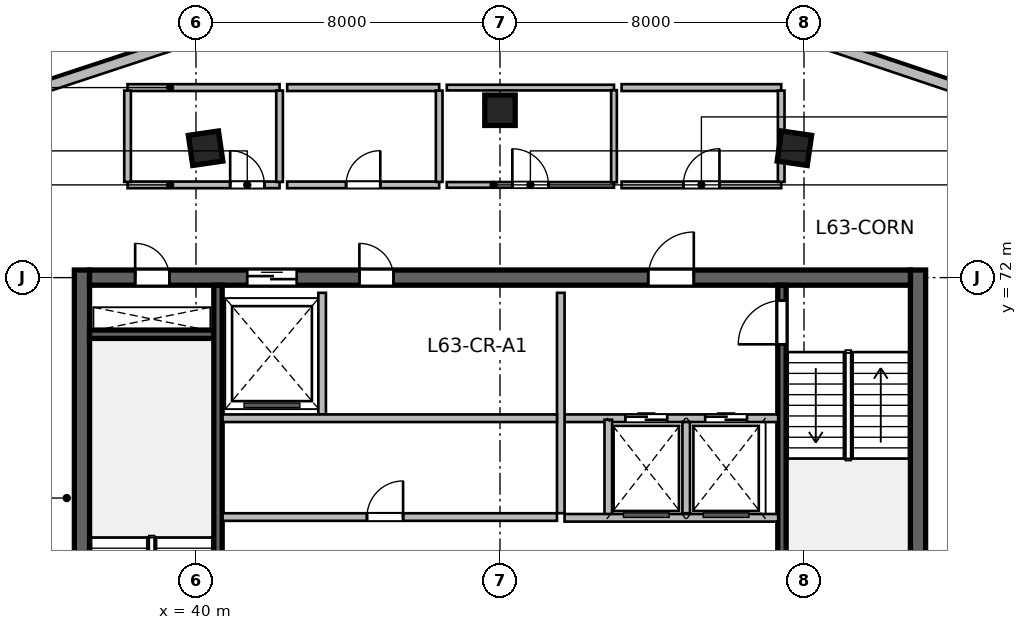
"""IFC4 building model, lengths in metres.
Left out: names, types, materials, properties, quantities, classifications, styles, units other than length and angle.
Written with IfcOpenShell. Run it as: python <this file> out.ifc"""

import sys

from ifc_helpers import new_model, si_unit, direction, frame, frame_2d, origin, origin_2d, place, context, subcontext, project, spatial, rectangle, extrude, source, transform, mapped, element, fill, save


model = new_model("IFC4")
c1 = context("Model", 3, precision=1e-05, world=origin(), true_north=direction((0.0, 1.0)))
c2 = subcontext(c1, "Body", "Model", "MODEL_VIEW")
j1 = project(units=[si_unit("LENGTHUNIT", "METRE"), si_unit("PLANEANGLEUNIT", "RADIAN")], contexts=[c1])
p1 = place(None, origin())
s1 = spatial("IfcSite", under=j1, at=p1, CompositionType="ELEMENT")
p2 = place(p1, origin())
s2 = spatial("IfcBuilding", under=s1, at=p2, CompositionType="ELEMENT")
p3 = place(p2, frame((0.0, 0.0, 260.1)))
s3 = spatial("IfcBuildingStorey", under=s2, at=p3, CompositionType="ELEMENT", Elevation=260.1)
m1 = source(origin(), c2, "Body", "SweptSolid", [
    extrude(rectangle(XDim=12.0, YDim=0.4, at=frame_2d((6.0, 0.0))), origin(), (0.0, 0.0, 1.0), 3.9),
])
for number, where, z_axis, x_axis in (
    (1, (37.0, 60.2, 0.0), (0.0, 0.0, 1.0), (0.0, 1.0, 0.0)),
    (2, (59.0, 60.2, 0.0), (0.0, 0.0, 1.0), (0.0, 1.0, 0.0)),
):
    element("IfcWall", number, at=place(p3, frame(where, z_axis=z_axis, x_axis=x_axis)), inside=s3, PredefinedType="SHEAR", context=c2, shape_type="MappedRepresentation", body=[
        mapped(m1, transform((0.0, 0.0, 0.0), scale=1.0)),
    ])
m2 = source(origin(), c2, "Body", "SweptSolid", [
    extrude(rectangle(XDim=21.6, YDim=0.4, at=frame_2d((10.8, 0.0))), origin(), (0.0, 0.0, 1.0), 3.9),
])
p4 = place(p3, frame((37.2, 72.0, 0.0), z_axis=(0.0, 0.0, 1.0), x_axis=(1.0, 0.0, 0.0)))
e3 = element("IfcWall", 3, at=p4, inside=s3, PredefinedType="SHEAR", context=c2, shape_type="MappedRepresentation", body=[
    mapped(m2, transform((0.0, 0.0, 0.0), scale=1.0)),
])
p5 = place(p4, frame((1.2, 0.0, 0.0)))
e4 = element("IfcOpeningElement", 4, at=p5, cuts=e3, PredefinedType="OPENING", context=c2, shape_type="SweptSolid", body=[
    extrude(rectangle(XDim=0.9, YDim=2.1, at=frame_2d((0.45, 1.05))), frame((0.0, 0.21, 0.0), z_axis=(0.0, -1.0, 0.0), x_axis=(1.0, 0.0, 0.0)), (0.0, 0.0, 1.0), 0.42),
])
p6 = place(p4, frame((14.7, 0.0, 0.0)))
e5 = element("IfcOpeningElement", 5, at=p6, cuts=e3, PredefinedType="OPENING", context=c2, shape_type="SweptSolid", body=[
    extrude(rectangle(XDim=1.2, YDim=2.15, at=frame_2d((0.6, 1.075))), frame((0.0, 0.21, 0.0), z_axis=(0.0, -1.0, 0.0), x_axis=(1.0, 0.0, 0.0)), (0.0, 0.0, 1.0), 0.42),
])
p7 = place(p4, frame((4.15, 0.0, 0.0)))
e6 = element("IfcOpeningElement", 6, at=p7, cuts=e3, PredefinedType="OPENING", context=c2, shape_type="SweptSolid", body=[
    extrude(rectangle(XDim=1.3, YDim=2.15, at=frame_2d((0.65, 1.075))), frame((0.0, 0.21, 0.0), z_axis=(0.0, -1.0, 0.0), x_axis=(1.0, 0.0, 0.0)), (0.0, 0.0, 1.0), 0.42),
])
p8 = place(p4, frame((7.1, 0.0, 0.0)))
e7 = element("IfcOpeningElement", 7, at=p8, cuts=e3, PredefinedType="OPENING", context=c2, shape_type="SweptSolid", body=[
    extrude(rectangle(XDim=0.9, YDim=2.1, at=frame_2d((0.45, 1.05))), frame((0.0, 0.21, 0.0), z_axis=(0.0, -1.0, 0.0), x_axis=(1.0, 0.0, 0.0)), (0.0, 0.0, 1.0), 0.42),
])
m3 = source(origin(), c2, "Body", "SweptSolid", [
    extrude(rectangle(XDim=3.27, YDim=0.22, at=frame_2d((1.635, 0.0))), origin(), (0.0, 0.0, 1.0), 3.9),
])
p9 = place(p3, frame((37.2, 70.51, 0.0), z_axis=(0.0, 0.0, 1.0), x_axis=(1.0, 0.0, 0.0)))
e8 = element("IfcWall", 8, at=p9, inside=s3, PredefinedType="SHEAR", context=c2, shape_type="MappedRepresentation", body=[
    mapped(m3, transform((0.0, 0.0, 0.0), scale=1.0)),
])
m4 = source(origin(), c2, "Body", "SweptSolid", [
    extrude(rectangle(XDim=11.2, YDim=0.22, at=frame_2d((5.6, 0.0))), origin(), (0.0, 0.0, 1.0), 3.9),
])
p10 = place(p3, frame((40.58, 60.6, 0.0), z_axis=(0.0, 0.0, 1.0), x_axis=(0.0, 1.0, 0.0)))
e9 = element("IfcWall", 9, at=p10, inside=s3, PredefinedType="SHEAR", context=c2, shape_type="MappedRepresentation", body=[
    mapped(m4, transform((0.0, 0.0, 0.0), scale=1.0)),
])
p11 = place(p3, frame((55.42, 60.6, 0.0), z_axis=(0.0, 0.0, 1.0), x_axis=(0.0, 1.0, 0.0)))
e10 = element("IfcWall", 10, at=p11, inside=s3, PredefinedType="SHEAR", context=c2, shape_type="MappedRepresentation", body=[
    mapped(m4, transform((0.0, 0.0, 0.0), scale=1.0)),
])
p12 = place(p11, frame((9.645, 0.0, 0.0)))
e11 = element("IfcOpeningElement", 11, at=p12, cuts=e10, PredefinedType="OPENING", context=c2, shape_type="SweptSolid", body=[
    extrude(rectangle(XDim=1.15, YDim=2.15, at=frame_2d((0.575, 1.075))), frame((0.0, 0.12, 0.0), z_axis=(0.0, -1.0, 0.0), x_axis=(1.0, 0.0, 0.0)), (0.0, 0.0, 1.0), 0.24),
])
m5 = source(origin(), c2, "Body", "SweptSolid", [
    extrude(rectangle(XDim=0.8, YDim=0.8, at=origin_2d()), origin(), (0.0, 0.0, 1.0), 3.9),
])
for number, where, z_axis, x_axis in (
    (12, (40.253, 75.404, 0.0), (0.0, 0.0, 1.0), (-0.143, 0.99, 0.0)),
    (13, (48.0, 76.404, 0.0), (0.0, 0.0, 1.0), (0.0, 1.0, 0.0)),
    (14, (55.747, 75.404, 0.0), (0.0, 0.0, 1.0), (0.143, 0.99, 0.0)),
):
    element("IfcColumn", number, at=place(p3, frame(where, z_axis=z_axis, x_axis=x_axis)), inside=s3, PredefinedType="COLUMN", context=c2, shape_type="MappedRepresentation", body=[
        mapped(m5, transform((0.0, 0.0, 0.0), scale=1.0)),
    ])
m6 = source(origin(), c2, "Body", "SweptSolid", [
    extrude(rectangle(XDim=3.54, YDim=0.28, at=frame_2d((1.77, 0.0))), origin(), (0.0, 0.0, 1.0), 3.65),
])
p13 = place(p3, frame((36.132, 77.049, 0.0), z_axis=(0.0, 0.0, 1.0), x_axis=(0.949678507031, 0.313226329165, 0.0)))
e15 = element("IfcWall", 15, at=p13, inside=s3, PredefinedType="SOLIDWALL", context=c2, shape_type="MappedRepresentation", body=[
    mapped(m6, transform((0.0, 0.0, 0.0), scale=1.0)),
])
m7 = source(origin(), c2, "Body", "SweptSolid", [
    extrude(rectangle(XDim=3.543, YDim=0.28, at=frame_2d((1.771, 0.0))), origin(), (0.0, 0.0, 1.0), 3.65),
])
p14 = place(p3, frame((56.688, 78.108, 0.0), z_axis=(0.0, 0.0, 1.0), x_axis=(0.947922565312, -0.318500879389, 0.0)))
e16 = element("IfcWall", 16, at=p14, inside=s3, PredefinedType="SOLIDWALL", context=c2, shape_type="MappedRepresentation", body=[
    mapped(m7, transform((0.0, 0.0, 0.0), scale=1.0)),
])
m8 = source(origin(), c2, "Body", "SweptSolid", [
    extrude(rectangle(XDim=5.62, YDim=0.2, at=frame_2d((2.81, 0.0))), origin(), (0.0, 0.0, 1.0), 3.65),
])
p15 = place(p3, frame((49.7, 68.3, 0.0), z_axis=(0.0, 0.0, 1.0), x_axis=(1.0, 0.0, 0.0)))
e17 = element("IfcWall", 17, at=p15, inside=s3, PredefinedType="SOLIDWALL", context=c2, shape_type="MappedRepresentation", body=[
    mapped(m8, transform((0.0, 0.0, 0.0), scale=1.0)),
])
p16 = place(p15, frame((1.6, 0.0, 0.0)))
e18 = element("IfcOpeningElement", 18, at=p16, cuts=e17, PredefinedType="OPENING", context=c2, shape_type="SweptSolid", body=[
    extrude(rectangle(XDim=1.1, YDim=2.15, at=frame_2d((0.55, 1.075))), frame((0.0, 0.11, 0.0), z_axis=(0.0, -1.0, 0.0), x_axis=(1.0, 0.0, 0.0)), (0.0, 0.0, 1.0), 0.22),
])
p17 = place(p15, frame((3.7, 0.0, 0.0)))
e19 = element("IfcOpeningElement", 19, at=p17, cuts=e17, PredefinedType="OPENING", context=c2, shape_type="SweptSolid", body=[
    extrude(rectangle(XDim=1.1, YDim=2.15, at=frame_2d((0.55, 1.075))), frame((0.0, 0.11, 0.0), z_axis=(0.0, -1.0, 0.0), x_axis=(1.0, 0.0, 0.0)), (0.0, 0.0, 1.0), 0.22),
])
m9 = source(origin(), c2, "Body", "SweptSolid", [
    extrude(rectangle(XDim=5.8, YDim=0.2, at=frame_2d((2.9, 0.0))), origin(), (0.0, 0.0, 1.0), 3.65),
])
p18 = place(p3, frame((49.6, 65.8, 0.0), z_axis=(0.0, 0.0, 1.0), x_axis=(0.0, 1.0, 0.0)))
e20 = element("IfcWall", 20, at=p18, inside=s3, PredefinedType="SOLIDWALL", context=c2, shape_type="MappedRepresentation", body=[
    mapped(m9, transform((0.0, 0.0, 0.0), scale=1.0)),
])
m10 = source(origin(), c2, "Body", "SweptSolid", [
    extrude(rectangle(XDim=2.58, YDim=0.2, at=frame_2d((1.29, 0.0))), origin(), (0.0, 0.0, 1.0), 3.65),
])
p19 = place(p3, frame((50.85, 65.68, 0.0), z_axis=(0.0, 0.0, 1.0), x_axis=(0.0, 1.0, 0.0)))
e21 = element("IfcWall", 21, at=p19, inside=s3, PredefinedType="SOLIDWALL", context=c2, shape_type="MappedRepresentation", body=[
    mapped(m10, transform((0.0, 0.0, 0.0), scale=1.0)),
])
m11 = source(origin(), c2, "Body", "SweptSolid", [
    extrude(rectangle(XDim=2.4, YDim=0.2, at=frame_2d((1.2, 0.0))), origin(), (0.0, 0.0, 1.0), 3.65),
])
p20 = place(p3, frame((52.9, 65.8, 0.0), z_axis=(0.0, 0.0, 1.0), x_axis=(0.0, 1.0, 0.0)))
e22 = element("IfcWall", 22, at=p20, inside=s3, PredefinedType="SOLIDWALL", context=c2, shape_type="MappedRepresentation", body=[
    mapped(m11, transform((0.0, 0.0, 0.0), scale=1.0)),
])
p21 = place(p3, frame((49.7, 65.68, 0.0), z_axis=(0.0, 0.0, 1.0), x_axis=(1.0, 0.0, 0.0)))
e23 = element("IfcWall", 23, at=p21, inside=s3, PredefinedType="SOLIDWALL", context=c2, shape_type="MappedRepresentation", body=[
    mapped(m8, transform((0.0, 0.0, 0.0), scale=1.0)),
])
m12 = source(origin(), c2, "Body", "SweptSolid", [
    extrude(rectangle(XDim=3.2, YDim=0.2, at=frame_2d((1.6, 0.0))), origin(), (0.0, 0.0, 1.0), 3.65),
])
p22 = place(p3, frame((43.32, 68.4, 0.0), z_axis=(0.0, 0.0, 1.0), x_axis=(0.0, 1.0, 0.0)))
e24 = element("IfcWall", 24, at=p22, inside=s3, PredefinedType="SOLIDWALL", context=c2, shape_type="MappedRepresentation", body=[
    mapped(m12, transform((0.0, 0.0, 0.0), scale=1.0)),
])
m13 = source(origin(), c2, "Body", "SweptSolid", [
    extrude(rectangle(XDim=8.8, YDim=0.2, at=frame_2d((4.4, 0.0))), origin(), (0.0, 0.0, 1.0), 3.65),
])
p23 = place(p3, frame((40.7, 68.3, 0.0), z_axis=(0.0, 0.0, 1.0), x_axis=(1.0, 0.0, 0.0)))
e25 = element("IfcWall", 25, at=p23, inside=s3, PredefinedType="SOLIDWALL", context=c2, shape_type="MappedRepresentation", body=[
    mapped(m13, transform((0.0, 0.0, 0.0), scale=1.0)),
])
p24 = place(p3, frame((40.7, 65.7, 0.0), z_axis=(0.0, 0.0, 1.0), x_axis=(1.0, 0.0, 0.0)))
e26 = element("IfcWall", 26, at=p24, inside=s3, PredefinedType="SOLIDWALL", context=c2, shape_type="MappedRepresentation", body=[
    mapped(m13, transform((0.0, 0.0, 0.0), scale=1.0)),
])
p25 = place(p24, frame((3.8, 0.0, 0.0)))
e27 = element("IfcOpeningElement", 27, at=p25, cuts=e26, PredefinedType="OPENING", context=c2, shape_type="SweptSolid", body=[
    extrude(rectangle(XDim=0.95, YDim=2.15, at=frame_2d((0.475, 1.075))), frame((0.0, 0.11, 0.0), z_axis=(0.0, -1.0, 0.0), x_axis=(1.0, 0.0, 0.0)), (0.0, 0.0, 1.0), 0.22),
])
m14 = source(origin(), c2, "Body", "SweptSolid", [
    extrude(rectangle(XDim=4.0, YDim=0.175, at=frame_2d((2.0, 0.0))), origin(), (0.0, 0.0, 1.0), 3.65),
])
p26 = place(p3, frame((38.2, 74.44, 0.0), z_axis=(0.0, 0.0, 1.0), x_axis=(1.0, 0.0, 0.0)))
e28 = element("IfcWall", 28, at=p26, inside=s3, PredefinedType="PARTITIONING", context=c2, shape_type="MappedRepresentation", body=[
    mapped(m14, transform((0.0, 0.0, 0.0), scale=1.0)),
])
p27 = place(p26, frame((2.7, 0.0, 0.0)))
e29 = element("IfcOpeningElement", 29, at=p27, cuts=e28, PredefinedType="OPENING", context=c2, shape_type="SweptSolid", body=[
    extrude(rectangle(XDim=0.9, YDim=2.08, at=frame_2d((0.45, 1.04))), frame((0.0, 0.098, 0.0), z_axis=(0.0, -1.0, 0.0), x_axis=(1.0, 0.0, 0.0)), (0.0, 0.0, 1.0), 0.195),
])
m15 = source(origin(), c2, "Body", "SweptSolid", [
    extrude(rectangle(XDim=4.0, YDim=0.18, at=frame_2d((2.0, 0.0))), origin(), (0.0, 0.0, 1.0), 3.65),
])
p28 = place(p3, frame((38.2, 77.0, 0.0), z_axis=(0.0, 0.0, 1.0), x_axis=(1.0, 0.0, 0.0)))
e30 = element("IfcWall", 30, at=p28, inside=s3, PredefinedType="PLUMBINGWALL", context=c2, shape_type="MappedRepresentation", body=[
    mapped(m15, transform((0.0, 0.0, 0.0), scale=1.0)),
])
m16 = source(origin(), c2, "Body", "SweptSolid", [
    extrude(rectangle(XDim=2.403, YDim=0.175, at=frame_2d((1.201, 0.0))), origin(), (0.0, 0.0, 1.0), 3.65),
])
for number, where, z_axis, x_axis in (
    (31, (38.2, 74.519, 0.0), (0.0, 0.0, 1.0), (0.0, 1.0, 0.0)),
    (32, (42.2, 74.519, 0.0), (0.0, 0.0, 1.0), (0.0, 1.0, 0.0)),
):
    element("IfcWall", number, at=place(p3, frame(where, z_axis=z_axis, x_axis=x_axis)), inside=s3, PredefinedType="PARTITIONING", context=c2, shape_type="MappedRepresentation", body=[
        mapped(m16, transform((0.0, 0.0, 0.0), scale=1.0)),
    ])
p29 = place(p3, frame((42.4, 74.44, 0.0), z_axis=(0.0, 0.0, 1.0), x_axis=(1.0, 0.0, 0.0)))
e33 = element("IfcWall", 33, at=p29, inside=s3, PredefinedType="PARTITIONING", context=c2, shape_type="MappedRepresentation", body=[
    mapped(m14, transform((0.0, 0.0, 0.0), scale=1.0)),
])
p30 = place(p29, frame((1.55, 0.0, 0.0)))
e34 = element("IfcOpeningElement", 34, at=p30, cuts=e33, PredefinedType="OPENING", context=c2, shape_type="SweptSolid", body=[
    extrude(rectangle(XDim=0.9, YDim=2.08, at=frame_2d((0.45, 1.04))), frame((0.0, 0.098, 0.0), z_axis=(0.0, -1.0, 0.0), x_axis=(1.0, 0.0, 0.0)), (0.0, 0.0, 1.0), 0.195),
])
p31 = place(p3, frame((42.4, 77.0, 0.0), z_axis=(0.0, 0.0, 1.0), x_axis=(1.0, 0.0, 0.0)))
e35 = element("IfcWall", 35, at=p31, inside=s3, PredefinedType="PLUMBINGWALL", context=c2, shape_type="MappedRepresentation", body=[
    mapped(m15, transform((0.0, 0.0, 0.0), scale=1.0)),
])
p32 = place(p3, frame((46.4, 74.519, 0.0), z_axis=(0.0, 0.0, 1.0), x_axis=(0.0, 1.0, 0.0)))
e36 = element("IfcWall", 36, at=p32, inside=s3, PredefinedType="PARTITIONING", context=c2, shape_type="MappedRepresentation", body=[
    mapped(m16, transform((0.0, 0.0, 0.0), scale=1.0)),
])
m17 = source(origin(), c2, "Body", "SweptSolid", [
    extrude(rectangle(XDim=4.4, YDim=0.15, at=frame_2d((2.2, 0.0))), origin(), (0.0, 0.0, 1.0), 3.65),
])
p33 = place(p3, frame((46.6, 74.44, 0.0), z_axis=(0.0, 0.0, 1.0), x_axis=(1.0, 0.0, 0.0)))
e37 = element("IfcWall", 37, at=p33, inside=s3, PredefinedType="PARTITIONING", context=c2, shape_type="MappedRepresentation", body=[
    mapped(m17, transform((0.0, 0.0, 0.0), scale=1.0)),
])
p34 = place(p33, frame((1.725, 0.0, 0.0)))
e38 = element("IfcOpeningElement", 38, at=p34, cuts=e37, PredefinedType="OPENING", context=c2, shape_type="SweptSolid", body=[
    extrude(rectangle(XDim=0.95, YDim=2.1, at=frame_2d((0.475, 1.05))), frame((0.0, 0.085, 0.0), z_axis=(0.0, -1.0, 0.0), x_axis=(1.0, 0.0, 0.0)), (0.0, 0.0, 1.0), 0.17),
])
p35 = place(p3, frame((46.6, 77.0, 0.0), z_axis=(0.0, 0.0, 1.0), x_axis=(1.0, 0.0, 0.0)))
e39 = element("IfcWall", 39, at=p35, inside=s3, PredefinedType="PARTITIONING", context=c2, shape_type="MappedRepresentation", body=[
    mapped(m17, transform((0.0, 0.0, 0.0), scale=1.0)),
])
m18 = source(origin(), c2, "Body", "SweptSolid", [
    extrude(rectangle(XDim=2.425, YDim=0.15, at=frame_2d((1.212, 0.0))), origin(), (0.0, 0.0, 1.0), 3.65),
])
p36 = place(p3, frame((51.0, 74.508, 0.0), z_axis=(0.0, 0.0, 1.0), x_axis=(0.0, 1.0, 0.0)))
e40 = element("IfcWall", 40, at=p36, inside=s3, PredefinedType="PARTITIONING", context=c2, shape_type="MappedRepresentation", body=[
    mapped(m18, transform((0.0, 0.0, 0.0), scale=1.0)),
])
m19 = source(origin(), c2, "Body", "SweptSolid", [
    extrude(rectangle(XDim=4.2, YDim=0.175, at=frame_2d((2.1, 0.0))), origin(), (0.0, 0.0, 1.0), 3.65),
])
p37 = place(p3, frame((51.2, 74.44, 0.0), z_axis=(0.0, 0.0, 1.0), x_axis=(1.0, 0.0, 0.0)))
e41 = element("IfcWall", 41, at=p37, inside=s3, PredefinedType="PARTITIONING", context=c2, shape_type="MappedRepresentation", body=[
    mapped(m19, transform((0.0, 0.0, 0.0), scale=1.0)),
])
p38 = place(p37, frame((1.625, 0.0, 0.0)))
e42 = element("IfcOpeningElement", 42, at=p38, cuts=e41, PredefinedType="OPENING", context=c2, shape_type="SweptSolid", body=[
    extrude(rectangle(XDim=0.95, YDim=2.12, at=frame_2d((0.475, 1.06))), frame((0.0, 0.098, 0.0), z_axis=(0.0, -1.0, 0.0), x_axis=(1.0, 0.0, 0.0)), (0.0, 0.0, 1.0), 0.195),
])
m20 = source(origin(), c2, "Body", "SweptSolid", [
    extrude(rectangle(XDim=4.2, YDim=0.18, at=frame_2d((2.1, 0.0))), origin(), (0.0, 0.0, 1.0), 3.65),
])
p39 = place(p3, frame((51.2, 77.0, 0.0), z_axis=(0.0, 0.0, 1.0), x_axis=(1.0, 0.0, 0.0)))
e43 = element("IfcWall", 43, at=p39, inside=s3, PredefinedType="PLUMBINGWALL", context=c2, shape_type="MappedRepresentation", body=[
    mapped(m20, transform((0.0, 0.0, 0.0), scale=1.0)),
])
p40 = place(p3, frame((55.4, 74.519, 0.0), z_axis=(0.0, 0.0, 1.0), x_axis=(0.0, 1.0, 0.0)))
e44 = element("IfcWall", 44, at=p40, inside=s3, PredefinedType="PARTITIONING", context=c2, shape_type="MappedRepresentation", body=[
    mapped(m16, transform((0.0, 0.0, 0.0), scale=1.0)),
])
m21 = source(origin(), c2, "Body", "SweptSolid", [
    extrude(rectangle(XDim=0.9, YDim=2.1, at=frame_2d((0.45, 1.05))), frame((0.0, 0.025, 0.0), z_axis=(0.0, -1.0, 0.0), x_axis=(1.0, 0.0, 0.0)), (0.0, 0.0, 1.0), 0.05),
])
p41 = place(p5, origin())
e45 = element("IfcDoor", 45, at=p41, inside=s3, OperationType="SINGLE_SWING_LEFT", PredefinedType="DOOR", context=c2, shape_type="MappedRepresentation", body=[
    mapped(m21, transform((0.0, 0.0, 0.0), scale=1.0)),
])
fill(e4, e45)
m22 = source(origin(), c2, "Body", "SweptSolid", [
    extrude(rectangle(XDim=1.15, YDim=2.15, at=frame_2d((0.575, 1.075))), frame((0.0, 0.025, 0.0), z_axis=(0.0, -1.0, 0.0), x_axis=(1.0, 0.0, 0.0)), (0.0, 0.0, 1.0), 0.05),
])
p42 = place(p12, origin())
e46 = element("IfcDoor", 46, at=p42, inside=s3, OperationType="SINGLE_SWING_LEFT", PredefinedType="DOOR", context=c2, shape_type="MappedRepresentation", body=[
    mapped(m22, transform((0.0, 0.0, 0.0), scale=1.0)),
])
fill(e11, e46)
m23 = source(origin(), c2, "Body", "SweptSolid", [
    extrude(rectangle(XDim=1.2, YDim=2.15, at=frame_2d((0.6, 1.075))), frame((0.0, 0.025, 0.0), z_axis=(0.0, -1.0, 0.0), x_axis=(1.0, 0.0, 0.0)), (0.0, 0.0, 1.0), 0.05),
])
p43 = place(p6, origin())
e47 = element("IfcDoor", 47, at=p43, inside=s3, OperationType="SINGLE_SWING_RIGHT", PredefinedType="DOOR", context=c2, shape_type="MappedRepresentation", body=[
    mapped(m23, transform((0.0, 0.0, 0.0), scale=1.0)),
])
fill(e5, e47)
m24 = source(origin(), c2, "Body", "SweptSolid", [
    extrude(rectangle(XDim=1.1, YDim=2.15, at=frame_2d((0.55, 1.075))), frame((0.0, 0.025, 0.0), z_axis=(0.0, -1.0, 0.0), x_axis=(1.0, 0.0, 0.0)), (0.0, 0.0, 1.0), 0.05),
])
p44 = place(p16, origin())
e48 = element("IfcDoor", 48, at=p44, inside=s3, OperationType="DOUBLE_DOOR_SLIDING", PredefinedType="DOOR", context=c2, shape_type="MappedRepresentation", body=[
    mapped(m24, transform((0.0, 0.0, 0.0), scale=1.0)),
])
fill(e18, e48)
p45 = place(p17, origin())
e49 = element("IfcDoor", 49, at=p45, inside=s3, OperationType="DOUBLE_DOOR_SLIDING", PredefinedType="DOOR", context=c2, shape_type="MappedRepresentation", body=[
    mapped(m24, transform((0.0, 0.0, 0.0), scale=1.0)),
])
fill(e19, e49)
m25 = source(origin(), c2, "Body", "SweptSolid", [
    extrude(rectangle(XDim=1.3, YDim=2.15, at=frame_2d((0.65, 1.075))), frame((0.0, 0.025, 0.0), z_axis=(0.0, -1.0, 0.0), x_axis=(1.0, 0.0, 0.0)), (0.0, 0.0, 1.0), 0.05),
])
p46 = place(p7, origin())
e50 = element("IfcDoor", 50, at=p46, inside=s3, OperationType="DOUBLE_DOOR_SLIDING", PredefinedType="DOOR", context=c2, shape_type="MappedRepresentation", body=[
    mapped(m25, transform((0.0, 0.0, 0.0), scale=1.0)),
])
fill(e6, e50)
p47 = place(p8, origin())
e51 = element("IfcDoor", 51, at=p47, inside=s3, OperationType="SINGLE_SWING_LEFT", PredefinedType="DOOR", context=c2, shape_type="MappedRepresentation", body=[
    mapped(m21, transform((0.0, 0.0, 0.0), scale=1.0)),
])
fill(e7, e51)
m26 = source(origin(), c2, "Body", "SweptSolid", [
    extrude(rectangle(XDim=0.95, YDim=2.15, at=frame_2d((0.475, 1.075))), frame((0.0, 0.025, 0.0), z_axis=(0.0, -1.0, 0.0), x_axis=(1.0, 0.0, 0.0)), (0.0, 0.0, 1.0), 0.05),
])
p48 = place(p25, origin())
e52 = element("IfcDoor", 52, at=p48, inside=s3, OperationType="SINGLE_SWING_RIGHT", PredefinedType="DOOR", context=c2, shape_type="MappedRepresentation", body=[
    mapped(m26, transform((0.0, 0.0, 0.0), scale=1.0)),
])
fill(e27, e52)
m27 = source(origin(), c2, "Body", "SweptSolid", [
    extrude(rectangle(XDim=0.9, YDim=2.08, at=frame_2d((0.45, 1.04))), frame((0.0, 0.025, 0.0), z_axis=(0.0, -1.0, 0.0), x_axis=(1.0, 0.0, 0.0)), (0.0, 0.0, 1.0), 0.05),
])
p49 = place(p27, origin())
e53 = element("IfcDoor", 53, at=p49, inside=s3, OperationType="SINGLE_SWING_LEFT", PredefinedType="DOOR", context=c2, shape_type="MappedRepresentation", body=[
    mapped(m27, transform((0.0, 0.0, 0.0), scale=1.0)),
])
fill(e29, e53)
p50 = place(p30, origin())
e54 = element("IfcDoor", 54, at=p50, inside=s3, OperationType="SINGLE_SWING_RIGHT", PredefinedType="DOOR", context=c2, shape_type="MappedRepresentation", body=[
    mapped(m27, transform((0.0, 0.0, 0.0), scale=1.0)),
])
fill(e34, e54)
m28 = source(origin(), c2, "Body", "SweptSolid", [
    extrude(rectangle(XDim=0.95, YDim=2.1, at=frame_2d((0.475, 1.05))), frame((0.0, 0.025, 0.0), z_axis=(0.0, -1.0, 0.0), x_axis=(1.0, 0.0, 0.0)), (0.0, 0.0, 1.0), 0.05),
])
p51 = place(p34, origin())
e55 = element("IfcDoor", 55, at=p51, inside=s3, OperationType="SINGLE_SWING_LEFT", PredefinedType="DOOR", context=c2, shape_type="MappedRepresentation", body=[
    mapped(m28, transform((0.0, 0.0, 0.0), scale=1.0)),
])
fill(e38, e55)
m29 = source(origin(), c2, "Body", "SweptSolid", [
    extrude(rectangle(XDim=0.95, YDim=2.12, at=frame_2d((0.475, 1.06))), frame((0.0, 0.025, 0.0), z_axis=(0.0, -1.0, 0.0), x_axis=(1.0, 0.0, 0.0)), (0.0, 0.0, 1.0), 0.05),
])
p52 = place(p38, origin())
e56 = element("IfcDoor", 56, at=p52, inside=s3, OperationType="SINGLE_SWING_RIGHT", PredefinedType="DOOR", context=c2, shape_type="MappedRepresentation", body=[
    mapped(m29, transform((0.0, 0.0, 0.0), scale=1.0)),
])
fill(e42, e56)
save(model, sys.argv[1])
